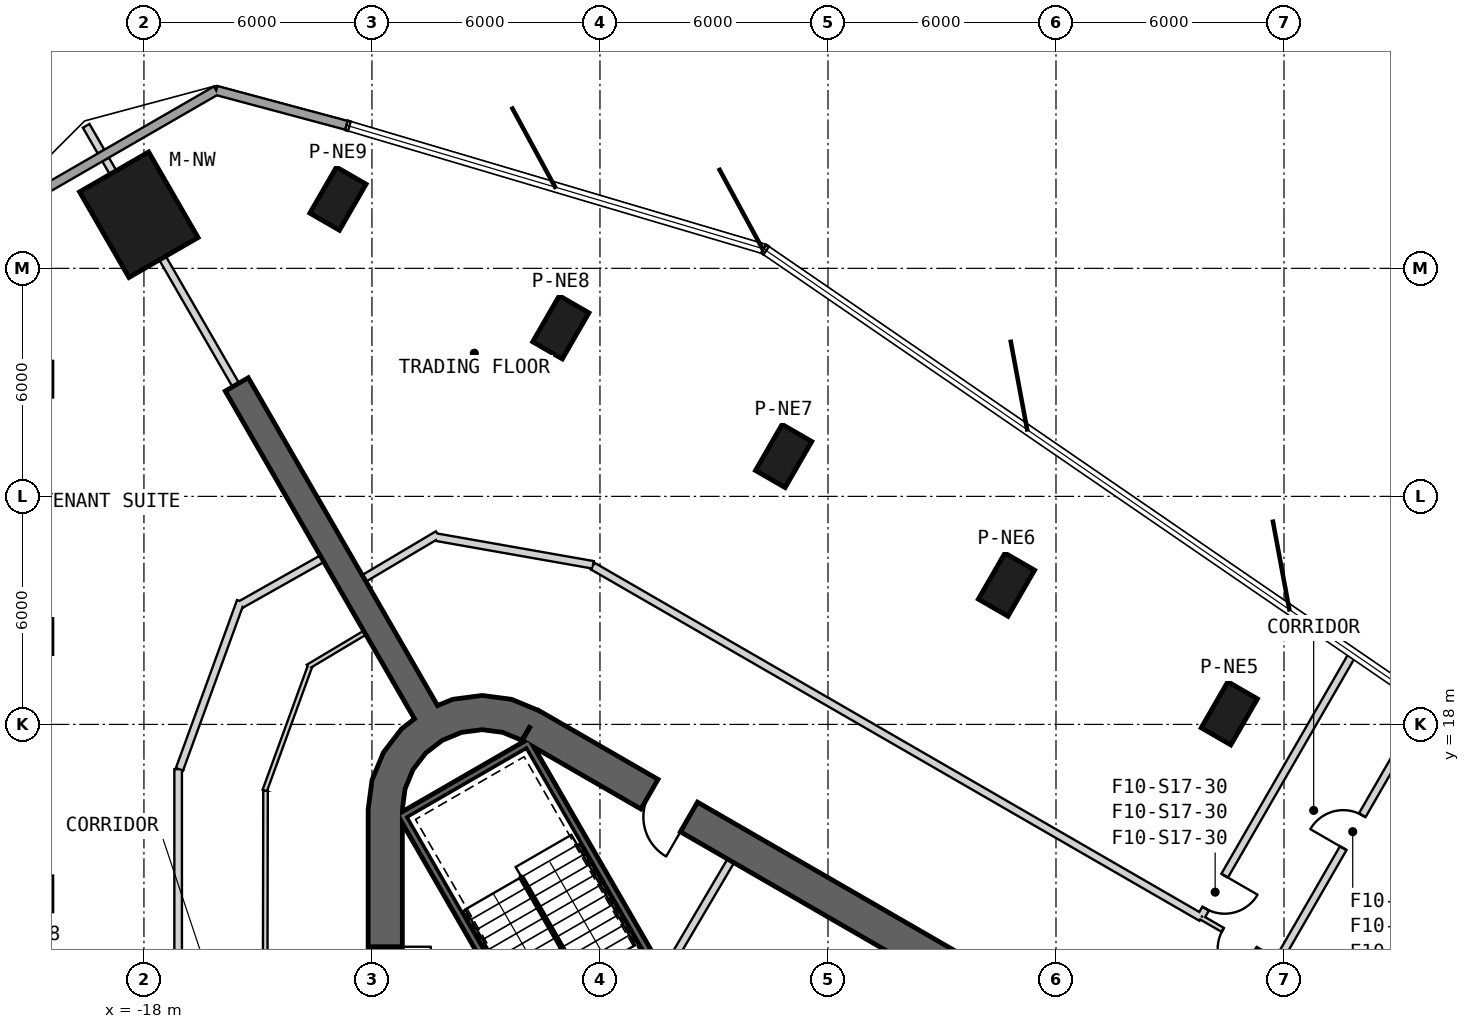
"""IFC4 building model, lengths in metres.
Left out: names, types, materials, properties, quantities, classifications, styles, units other than length and angle.
Written with IfcOpenShell. Run it as: python <this file> out.ifc"""

import sys

from ifc_helpers import new_model, si_unit, direction, frame, frame_2d, origin, origin_2d, place, context, subcontext, project, spatial, polyline, rectangle, outline, extrude, element, fill, save


model = new_model("IFC4")
c1 = context("Model", 3, precision=1e-05, world=origin(), true_north=direction((0.0, 1.0)))
c2 = subcontext(c1, "Body", "Model", "MODEL_VIEW")
j1 = project(units=[si_unit("LENGTHUNIT", "METRE"), si_unit("PLANEANGLEUNIT", "RADIAN")], contexts=[c1])
p1 = place(None, origin())
s1 = spatial("IfcSite", under=j1, at=p1, CompositionType="ELEMENT")
p2 = place(p1, origin())
s2 = spatial("IfcBuilding", under=s1, at=p2, CompositionType="ELEMENT")
p3 = place(p2, frame((0.0, 0.0, 265.2)))
s3 = spatial("IfcBuildingStorey", under=s2, at=p3, CompositionType="ELEMENT", Elevation=265.2)
p4 = place(p3, frame((-18.135, 31.411, 0.0), z_axis=(0.0, 0.0, 1.0), x_axis=(-0.5, 0.866025403784, 0.0)))
e1 = element("IfcColumn", 1, at=p4, inside=s3, PredefinedType="COLUMN", context=c2, shape_type="SweptSolid", body=[
    extrude(rectangle(XDim=2.6, YDim=2.1, at=origin_2d()), origin(), (0.0, 0.0, 1.0), 4.0),
])
for number, where, z_axis, x_axis in (
    (2, (-21.121, 27.084, 0.0), (0.0, 0.0, 1.0), (-1.0, 0.0, 0.0)),
    (3, (-21.121, 20.313, 0.0), (0.0, 0.0, 1.0), (-1.0, 0.0, 0.0)),
    (4, (-21.121, 13.542, 0.0), (0.0, 0.0, 1.0), (-1.0, 0.0, 0.0)),
    (5, (10.561, 18.292, 0.0), (0.0, 0.0, 1.0), (0.5, 0.866, 0.0)),
    (6, (4.697, 21.677, 0.0), (0.0, 0.0, 1.0), (0.5, 0.866, 0.0)),
    (7, (-1.167, 25.063, 0.0), (0.0, 0.0, 1.0), (0.5, 0.866, 0.0)),
    (8, (-7.031, 28.448, 0.0), (0.0, 0.0, 1.0), (0.5, 0.866, 0.0)),
    (9, (-12.895, 31.833, 0.0), (0.0, 0.0, 1.0), (0.5, 0.866, 0.0)),
):
    element("IfcColumn", number, at=place(p3, frame(where, z_axis=z_axis, x_axis=x_axis)), inside=s3, PredefinedType="COLUMN", context=c2, shape_type="SweptSolid", body=[
        extrude(rectangle(XDim=1.4, YDim=0.9, at=origin_2d()), origin(), (0.0, 0.0, 1.0), 4.0),
    ])
p5 = place(p3, frame((19.475, 2.208, 0.0), z_axis=(0.0, 0.0, 1.0), x_axis=(-0.866028369851, 0.499994862586, 0.0)))
e10 = element("IfcWall", 10, at=p5, inside=s3, PredefinedType="SHEAR", context=c2, shape_type="SweptSolid", body=[
    extrude(rectangle(XDim=31.523, YDim=0.9, at=frame_2d((15.762, 0.0))), origin(), (0.0, 0.0, 1.0), 4.0),
])
p6 = place(p5, frame((7.062, 0.0, 0.0)))
e11 = element("IfcOpeningElement", 11, at=p6, cuts=e10, PredefinedType="OPENING", context=c2, shape_type="SweptSolid", body=[
    extrude(rectangle(XDim=1.2, YDim=2.4, at=frame_2d((0.6, 1.2))), frame((0.0, 0.46, 0.0), z_axis=(0.0, -1.0, 0.0), x_axis=(1.0, 0.0, 0.0)), (0.0, 0.0, 1.0), 0.92),
])
p7 = place(p5, frame((3.612, 0.0, 0.0)))
e12 = element("IfcOpeningElement", 12, at=p7, cuts=e10, PredefinedType="OPENING", context=c2, shape_type="SweptSolid", body=[
    extrude(rectangle(XDim=1.2, YDim=2.4, at=frame_2d((0.6, 1.2))), frame((0.0, 0.46, 0.0), z_axis=(0.0, -1.0, 0.0), x_axis=(1.0, 0.0, 0.0)), (0.0, 0.0, 1.0), 0.92),
])
p8 = place(p5, frame((26.712, 0.0, 0.0)))
e13 = element("IfcOpeningElement", 13, at=p8, cuts=e10, PredefinedType="OPENING", context=c2, shape_type="SweptSolid", body=[
    extrude(rectangle(XDim=1.2, YDim=2.4, at=frame_2d((0.6, 1.2))), frame((0.0, 0.46, 0.0), z_axis=(0.0, -1.0, 0.0), x_axis=(1.0, 0.0, 0.0)), (0.0, 0.0, 1.0), 0.92),
])
p9 = place(p3, frame((-11.65, 15.762, 0.0), z_axis=(0.0, 0.0, 1.0), x_axis=(0.0, -1.0, 0.0)))
e14 = element("IfcWall", 14, at=p9, inside=s3, PredefinedType="SHEAR", context=c2, shape_type="SweptSolid", body=[
    extrude(rectangle(XDim=31.523, YDim=0.9, at=frame_2d((15.762, 0.0))), origin(), (0.0, 0.0, 1.0), 4.0),
])
p10 = place(p9, frame((7.062, 0.0, 0.0)))
e15 = element("IfcOpeningElement", 15, at=p10, cuts=e14, PredefinedType="OPENING", context=c2, shape_type="SweptSolid", body=[
    extrude(rectangle(XDim=1.2, YDim=2.4, at=frame_2d((0.6, 1.2))), frame((0.0, 0.46, 0.0), z_axis=(0.0, -1.0, 0.0), x_axis=(1.0, 0.0, 0.0)), (0.0, 0.0, 1.0), 0.92),
])
p11 = place(p9, frame((9.762, 0.0, 0.0)))
e16 = element("IfcOpeningElement", 16, at=p11, cuts=e14, PredefinedType="OPENING", context=c2, shape_type="SweptSolid", body=[
    extrude(rectangle(XDim=1.2, YDim=2.4, at=frame_2d((0.6, 1.2))), frame((0.0, 0.46, 0.0), z_axis=(0.0, -1.0, 0.0), x_axis=(1.0, 0.0, 0.0)), (0.0, 0.0, 1.0), 0.92),
])
p12 = place(p9, frame((12.462, 0.0, 0.0)))
e17 = element("IfcOpeningElement", 17, at=p12, cuts=e14, PredefinedType="OPENING", context=c2, shape_type="SweptSolid", body=[
    extrude(rectangle(XDim=1.2, YDim=2.4, at=frame_2d((0.6, 1.2))), frame((0.0, 0.46, 0.0), z_axis=(0.0, -1.0, 0.0), x_axis=(1.0, 0.0, 0.0)), (0.0, 0.0, 1.0), 0.92),
])
p13 = place(p9, frame((15.162, 0.0, 0.0)))
e18 = element("IfcOpeningElement", 18, at=p13, cuts=e14, PredefinedType="OPENING", context=c2, shape_type="SweptSolid", body=[
    extrude(rectangle(XDim=1.2, YDim=2.4, at=frame_2d((0.6, 1.2))), frame((0.0, 0.46, 0.0), z_axis=(0.0, -1.0, 0.0), x_axis=(1.0, 0.0, 0.0)), (0.0, 0.0, 1.0), 0.92),
])
p14 = place(p9, frame((17.862, 0.0, 0.0)))
e19 = element("IfcOpeningElement", 19, at=p14, cuts=e14, PredefinedType="OPENING", context=c2, shape_type="SweptSolid", body=[
    extrude(rectangle(XDim=1.2, YDim=2.4, at=frame_2d((0.6, 1.2))), frame((0.0, 0.46, 0.0), z_axis=(0.0, -1.0, 0.0), x_axis=(1.0, 0.0, 0.0)), (0.0, 0.0, 1.0), 0.92),
])
p15 = place(p9, frame((20.562, 0.0, 0.0)))
e20 = element("IfcOpeningElement", 20, at=p15, cuts=e14, PredefinedType="OPENING", context=c2, shape_type="SweptSolid", body=[
    extrude(rectangle(XDim=1.2, YDim=2.4, at=frame_2d((0.6, 1.2))), frame((0.0, 0.46, 0.0), z_axis=(0.0, -1.0, 0.0), x_axis=(1.0, 0.0, 0.0)), (0.0, 0.0, 1.0), 0.92),
])
p16 = place(p9, frame((23.262, 0.0, 0.0)))
e21 = element("IfcOpeningElement", 21, at=p16, cuts=e14, PredefinedType="OPENING", context=c2, shape_type="SweptSolid", body=[
    extrude(rectangle(XDim=1.2, YDim=2.4, at=frame_2d((0.6, 1.2))), frame((0.0, 0.46, 0.0), z_axis=(0.0, -1.0, 0.0), x_axis=(1.0, 0.0, 0.0)), (0.0, 0.0, 1.0), 0.92),
])
p17 = place(p9, frame((3.612, 0.0, 0.0)))
e22 = element("IfcOpeningElement", 22, at=p17, cuts=e14, PredefinedType="OPENING", context=c2, shape_type="SweptSolid", body=[
    extrude(rectangle(XDim=1.2, YDim=2.4, at=frame_2d((0.6, 1.2))), frame((0.0, 0.46, 0.0), z_axis=(0.0, -1.0, 0.0), x_axis=(1.0, 0.0, 0.0)), (0.0, 0.0, 1.0), 0.92),
])
p18 = place(p9, frame((26.712, 0.0, 0.0)))
e23 = element("IfcOpeningElement", 23, at=p18, cuts=e14, PredefinedType="OPENING", context=c2, shape_type="SweptSolid", body=[
    extrude(rectangle(XDim=1.2, YDim=2.4, at=frame_2d((0.6, 1.2))), frame((0.0, 0.46, 0.0), z_axis=(0.0, -1.0, 0.0), x_axis=(1.0, 0.0, 0.0)), (0.0, 0.0, 1.0), 0.92),
])
p19 = place(p3, origin())
e24 = element("IfcWall", 24, at=p19, inside=s3, PredefinedType="SHEAR", context=c2, shape_type="SweptSolid", body=[
    extrude(outline(polyline([(-7.6, 18.36), (-8.323, 18.659), (-9.1, 18.762), (-9.876, 18.659), (-10.6, 18.36), (-11.221, 17.883), (-11.698, 17.262), (-11.998, 16.538), (-12.1, 15.762), (-11.2, 15.762), (-11.128, 16.305), (-10.919, 16.812), (-10.585, 17.247), (-10.15, 17.58), (-9.644, 17.79), (-9.1, 17.862), (-8.556, 17.79), (-8.05, 17.58), (-7.6, 18.36)])), origin(), (0.0, 0.0, 1.0), 4.0),
])
p20 = place(p3, frame((-10.575, 18.316, 0.0), z_axis=(0.0, 0.0, 1.0), x_axis=(-0.500007350791, 0.866021159762, 0.0)))
e25 = element("IfcWall", 25, at=p20, inside=s3, PredefinedType="SHEAR", context=c2, shape_type="SweptSolid", body=[
    extrude(rectangle(XDim=9.965, YDim=0.7, at=frame_2d((4.982, 0.0))), origin(), (0.0, 0.0, 1.0), 4.0),
])
p21 = place(p3, frame((-12.67, 33.764, 0.0), z_axis=(0.0, 0.0, 1.0), x_axis=(-0.965927175343, 0.258814010312, 0.0)))
e26 = element("IfcWall", 26, at=p21, inside=s3, PredefinedType="SOLIDWALL", context=c2, shape_type="SweptSolid", body=[
    extrude(rectangle(XDim=3.55, YDim=0.24, at=frame_2d((1.775, 0.0))), origin(), (0.0, 0.0, 1.0), 3.7),
])
p22 = place(p3, frame((-16.099, 34.682, 0.0), z_axis=(0.0, 0.0, 1.0), x_axis=(-0.866022320763, -0.500005339912, 0.0)))
e27 = element("IfcWall", 27, at=p22, inside=s3, PredefinedType="SOLIDWALL", context=c2, shape_type="SweptSolid", body=[
    extrude(rectangle(XDim=6.798, YDim=0.24, at=frame_2d((3.399, 0.0))), origin(), (0.0, 0.0, 1.0), 3.7),
])
p23 = place(p3, frame((-11.245, 15.678, -0.3), z_axis=(0.0, 0.0, 1.0), x_axis=(0.499977274689, -0.866038523851, 0.0)))
e28 = element("IfcWall", 28, at=p23, inside=s3, PredefinedType="SHEAR", context=c2, shape_type="SweptSolid", body=[
    extrude(rectangle(XDim=8.1, YDim=0.2, at=frame_2d((4.05, 0.0))), origin(), (0.0, 0.0, 1.0), 4.0),
])
p24 = place(p3, frame((-7.818, 17.541, -0.3), z_axis=(0.0, 0.0, 1.0), x_axis=(-0.866044365799, -0.499967155389, 0.0)))
e29 = element("IfcWall", 29, at=p24, inside=s3, PredefinedType="SHEAR", context=c2, shape_type="SweptSolid", body=[
    extrude(rectangle(XDim=3.8, YDim=0.2, at=frame_2d((1.9, 0.0))), origin(), (0.0, 0.0, 1.0), 4.0),
])
p25 = place(p3, frame((-7.854, 17.405, -0.3), z_axis=(0.0, 0.0, 1.0), x_axis=(0.499997992926, -0.866026562566, 0.0)))
e30 = element("IfcWall", 30, at=p25, inside=s3, PredefinedType="SHEAR", context=c2, shape_type="SweptSolid", body=[
    extrude(rectangle(XDim=7.9, YDim=0.2, at=frame_2d((3.95, 0.0))), origin(), (0.0, 0.0, 1.0), 4.0),
])
p26 = place(p3, frame((-2.558, 14.409, 0.0), z_axis=(0.0, 0.0, 1.0), x_axis=(-0.508018930956, -0.861345903683, 0.0)))
e31 = element("IfcWall", 31, at=p26, inside=s3, PredefinedType="PARTITIONING", context=c2, shape_type="SweptSolid", body=[
    extrude(rectangle(XDim=3.15, YDim=0.2, at=frame_2d((1.575, 0.0))), origin(), (0.0, 0.0, 1.0), 3.7),
])
p27 = place(p3, frame((-12.189, 20.411, 0.0), z_axis=(0.0, 0.0, 1.0), x_axis=(-0.858492721014, -0.51282574815, 0.0)))
e32 = element("IfcWall", 32, at=p27, inside=s3, PredefinedType="PARTITIONING", context=c2, shape_type="SweptSolid", body=[
    extrude(rectangle(XDim=1.742, YDim=0.12, at=frame_2d((0.871, 0.0))), origin(), (0.0, 0.0, 1.0), 3.7),
])
p28 = place(p3, frame((-13.631, 19.53, 0.0), z_axis=(0.0, 0.0, 1.0), x_axis=(-0.342069878069, -0.939674517329, 0.0)))
e33 = element("IfcWall", 33, at=p28, inside=s3, PredefinedType="PARTITIONING", context=c2, shape_type="SweptSolid", body=[
    extrude(rectangle(XDim=3.479, YDim=0.12, at=frame_2d((1.739, 0.0))), origin(), (0.0, 0.0, 1.0), 2.88),
])
p29 = place(p3, frame((-14.8, 16.257, 0.0), z_axis=(0.0, 0.0, 1.0), x_axis=(-0.001847148781, -0.999998294019, 0.0)))
e34 = element("IfcWall", 34, at=p29, inside=s3, PredefinedType="PARTITIONING", context=c2, shape_type="SweptSolid", body=[
    extrude(rectangle(XDim=16.257, YDim=0.12, at=frame_2d((8.128, 0.0))), origin(), (0.0, 0.0, 1.0), 2.98),
])
p30 = place(p29, frame((7.629, 0.0, 0.0)))
e35 = element("IfcOpeningElement", 35, at=p30, cuts=e34, PredefinedType="OPENING", context=c2, shape_type="SweptSolid", body=[
    extrude(rectangle(XDim=1.0, YDim=2.1, at=frame_2d((0.5, 1.05))), frame((0.0, 0.07, 0.0), z_axis=(0.0, -1.0, 0.0), x_axis=(1.0, 0.0, 0.0)), (0.0, 0.0, 1.0), 0.14),
])
p31 = place(p3, frame((-17.1, 16.823, 0.0), z_axis=(0.0, 0.0, 1.0), x_axis=(0.0, -1.0, 0.0)))
e36 = element("IfcWall", 36, at=p31, inside=s3, PredefinedType="PARTITIONING", context=c2, shape_type="SweptSolid", body=[
    extrude(rectangle(XDim=12.473, YDim=0.2, at=frame_2d((6.236, 0.0))), origin(), (0.0, 0.0, 1.0), 2.98),
])
p32 = place(p31, frame((5.776, 0.0, 0.0)))
e37 = element("IfcOpeningElement", 37, at=p32, cuts=e36, PredefinedType="OPENING", context=c2, shape_type="SweptSolid", body=[
    extrude(rectangle(XDim=1.0, YDim=2.1, at=frame_2d((0.5, 1.05))), frame((0.0, 0.11, 0.0), z_axis=(0.0, -1.0, 0.0), x_axis=(1.0, 0.0, 0.0)), (0.0, 0.0, 1.0), 0.22),
])
p33 = place(p3, frame((-15.456, 21.239, 0.0), z_axis=(0.0, 0.0, 1.0), x_axis=(-0.34205546997, -0.939679762187, 0.0)))
e38 = element("IfcWall", 38, at=p33, inside=s3, PredefinedType="PARTITIONING", context=c2, shape_type="SweptSolid", body=[
    extrude(rectangle(XDim=4.706, YDim=0.2, at=frame_2d((2.353, 0.0))), origin(), (0.0, 0.0, 1.0), 2.88),
])
p34 = place(p3, frame((-13.313, 22.359, 0.0), z_axis=(0.0, 0.0, 1.0), x_axis=(-0.87121710687, -0.490897904555, 0.0)))
e39 = element("IfcWall", 39, at=p34, inside=s3, PredefinedType="PARTITIONING", context=c2, shape_type="SweptSolid", body=[
    extrude(rectangle(XDim=2.457, YDim=0.2, at=frame_2d((1.229, 0.0))), origin(), (0.0, 0.0, 1.0), 3.7),
])
p35 = place(p3, frame((11.817, 11.768, 0.0), z_axis=(0.0, 0.0, 1.0), x_axis=(-0.86602648383, 0.499998129301, 0.0)))
e40 = element("IfcWall", 40, at=p35, inside=s3, PredefinedType="PARTITIONING", context=c2, shape_type="SweptSolid", body=[
    extrude(rectangle(XDim=2.3, YDim=0.12, at=frame_2d((1.15, 0.0))), origin(), (0.0, 0.0, 1.0), 3.7),
])
p36 = place(p35, frame((0.65, 0.0, 0.0)))
e41 = element("IfcOpeningElement", 41, at=p36, cuts=e40, PredefinedType="OPENING", context=c2, shape_type="SweptSolid", body=[
    extrude(rectangle(XDim=1.0, YDim=2.1, at=frame_2d((0.5, 1.05))), frame((0.0, 0.07, 0.0), z_axis=(0.0, -1.0, 0.0), x_axis=(1.0, 0.0, 0.0)), (0.0, 0.0, 1.0), 0.14),
])
p37 = place(p3, frame((9.825, 12.918, 0.0), z_axis=(0.0, 0.0, 1.0), x_axis=(-0.866022708987, 0.500004667497, 0.0)))
e42 = element("IfcWall", 42, at=p37, inside=s3, PredefinedType="PARTITIONING", context=c2, shape_type="SweptSolid", body=[
    extrude(rectangle(XDim=18.496, YDim=0.2, at=frame_2d((9.248, 0.0))), origin(), (0.0, 0.0, 1.0), 2.98),
])
p38 = place(p3, frame((-10.265, 22.996, 0.0), z_axis=(0.0, 0.0, 1.0), x_axis=(-0.859934823121, -0.510403859687, 0.0)))
e43 = element("IfcWall", 43, at=p38, inside=s3, PredefinedType="PARTITIONING", context=c2, shape_type="SweptSolid", body=[
    extrude(rectangle(XDim=2.258, YDim=0.2, at=frame_2d((1.129, 0.0))), origin(), (0.0, 0.0, 1.0), 3.7),
])
p39 = place(p3, frame((-6.181, 22.199, 0.0), z_axis=(0.0, 0.0, 1.0), x_axis=(-0.984807544765, 0.17364935869, 0.0)))
e44 = element("IfcWall", 44, at=p39, inside=s3, PredefinedType="PARTITIONING", context=c2, shape_type="SweptSolid", body=[
    extrude(rectangle(XDim=4.199, YDim=0.2, at=frame_2d((2.1, 0.0))), origin(), (0.0, 0.0, 1.0), 2.88),
])
p40 = place(p3, frame((-19.52, 33.75, 0.0), z_axis=(0.0, 0.0, 1.0), x_axis=(0.499929430274, -0.866066143401, 0.0)))
e45 = element("IfcWall", 45, at=p40, inside=s3, PredefinedType="PARTITIONING", context=c2, shape_type="SweptSolid", body=[
    extrude(rectangle(XDim=0.783, YDim=0.2, at=frame_2d((0.391, 0.0))), origin(), (0.0, 0.0, 1.0), 3.7),
])
p41 = place(p3, frame((-19.009, 32.864, 0.0), z_axis=(0.0, 0.0, 1.0), x_axis=(0.500061319399, -0.865989998118, 0.0)))
e46 = element("IfcWall", 46, at=p41, inside=s3, PredefinedType="PARTITIONING", context=c2, shape_type="SweptSolid", body=[
    extrude(rectangle(XDim=0.395, YDim=0.2, at=frame_2d((0.198, 0.0))), origin(), (0.0, 0.0, 1.0), 3.7),
])
p42 = place(p3, frame((-17.511, 30.27, 0.0), z_axis=(0.0, 0.0, 1.0), x_axis=(0.499980071345, -0.866036909293, 0.0)))
e47 = element("IfcWall", 47, at=p42, inside=s3, PredefinedType="PARTITIONING", context=c2, shape_type="SweptSolid", body=[
    extrude(rectangle(XDim=3.856, YDim=0.2, at=frame_2d((1.928, 0.0))), origin(), (0.0, 0.0, 1.0), 3.27),
])
p43 = place(p3, frame((11.865, 11.81, 0.0), z_axis=(0.0, 0.0, 1.0), x_axis=(0.500025956197, 0.866010417449, 0.0)))
e48 = element("IfcWall", 48, at=p43, inside=s3, PredefinedType="PARTITIONING", context=c2, shape_type="SweptSolid", body=[
    extrude(rectangle(XDim=7.775, YDim=0.2, at=frame_2d((3.888, 0.0))), origin(), (0.0, 0.0, 1.0), 3.7),
])
p44 = place(p43, frame((3.388, 0.0, 0.0)))
e49 = element("IfcOpeningElement", 49, at=p44, cuts=e48, PredefinedType="OPENING", context=c2, shape_type="SweptSolid", body=[
    extrude(rectangle(XDim=1.0, YDim=2.1, at=frame_2d((0.5, 1.05))), frame((0.0, 0.11, 0.0), z_axis=(0.0, -1.0, 0.0), x_axis=(1.0, 0.0, 0.0)), (0.0, 0.0, 1.0), 0.22),
])
p45 = place(p3, frame((13.817, 19.872, 0.0), z_axis=(0.0, 0.0, 1.0), x_axis=(-0.499989797406, -0.866031294175, 0.0)))
e50 = element("IfcWall", 50, at=p45, inside=s3, PredefinedType="PARTITIONING", context=c2, shape_type="SweptSolid", body=[
    extrude(rectangle(XDim=7.958, YDim=0.2, at=frame_2d((3.979, 0.0))), origin(), (0.0, 0.0, 1.0), 3.7),
])
p46 = place(p45, frame((6.758, 0.0, 0.0)))
e51 = element("IfcOpeningElement", 51, at=p46, cuts=e50, PredefinedType="OPENING", context=c2, shape_type="SweptSolid", body=[
    extrude(rectangle(XDim=1.0, YDim=2.1, at=frame_2d((0.5, 1.05))), frame((0.0, 0.11, 0.0), z_axis=(0.0, -1.0, 0.0), x_axis=(1.0, 0.0, 0.0)), (0.0, 0.0, 1.0), 0.22),
])
p47 = place(p36, origin())
e52 = element("IfcDoor", 52, at=p47, inside=s3, OperationType="SINGLE_SWING_RIGHT", PredefinedType="NOTDEFINED", context=c2, shape_type="SweptSolid", body=[
    extrude(rectangle(XDim=1.0, YDim=2.1, at=frame_2d((0.5, 1.05))), frame((0.0, 0.025, 0.0), z_axis=(0.0, -1.0, 0.0), x_axis=(1.0, 0.0, 0.0)), (0.0, 0.0, 1.0), 0.05),
])
fill(e41, e52)
p48 = place(p44, origin())
e53 = element("IfcDoor", 53, at=p48, inside=s3, OperationType="SINGLE_SWING_LEFT", PredefinedType="USERDEFINED", context=c2, shape_type="SweptSolid", body=[
    extrude(rectangle(XDim=1.0, YDim=2.1, at=frame_2d((0.5, 1.05))), frame((0.0, 0.025, 0.0), z_axis=(0.0, -1.0, 0.0), x_axis=(1.0, 0.0, 0.0)), (0.0, 0.0, 1.0), 0.05),
])
fill(e49, e53)
p49 = place(p46, origin())
e54 = element("IfcDoor", 54, at=p49, inside=s3, OperationType="SINGLE_SWING_RIGHT", PredefinedType="USERDEFINED", context=c2, shape_type="SweptSolid", body=[
    extrude(rectangle(XDim=1.0, YDim=2.1, at=frame_2d((0.5, 1.05))), frame((0.0, 0.025, 0.0), z_axis=(0.0, -1.0, 0.0), x_axis=(1.0, 0.0, 0.0)), (0.0, 0.0, 1.0), 0.05),
])
fill(e51, e54)
p50 = place(p8, origin())
e55 = element("IfcDoor", 55, at=p50, inside=s3, OperationType="SINGLE_SWING_RIGHT", PredefinedType="USERDEFINED", context=c2, shape_type="SweptSolid", body=[
    extrude(rectangle(XDim=1.2, YDim=2.4, at=frame_2d((0.6, 1.2))), frame((0.0, 0.025, 0.0), z_axis=(0.0, -1.0, 0.0), x_axis=(1.0, 0.0, 0.0)), (0.0, 0.0, 1.0), 0.05),
])
fill(e13, e55)
p51 = place(p17, origin())
e56 = element("IfcDoor", 56, at=p51, inside=s3, OperationType="SINGLE_SWING_RIGHT", PredefinedType="USERDEFINED", context=c2, shape_type="SweptSolid", body=[
    extrude(rectangle(XDim=1.2, YDim=2.4, at=frame_2d((0.6, 1.2))), frame((0.0, 0.025, 0.0), z_axis=(0.0, -1.0, 0.0), x_axis=(1.0, 0.0, 0.0)), (0.0, 0.0, 1.0), 0.05),
])
fill(e22, e56)
save(model, sys.argv[1])
